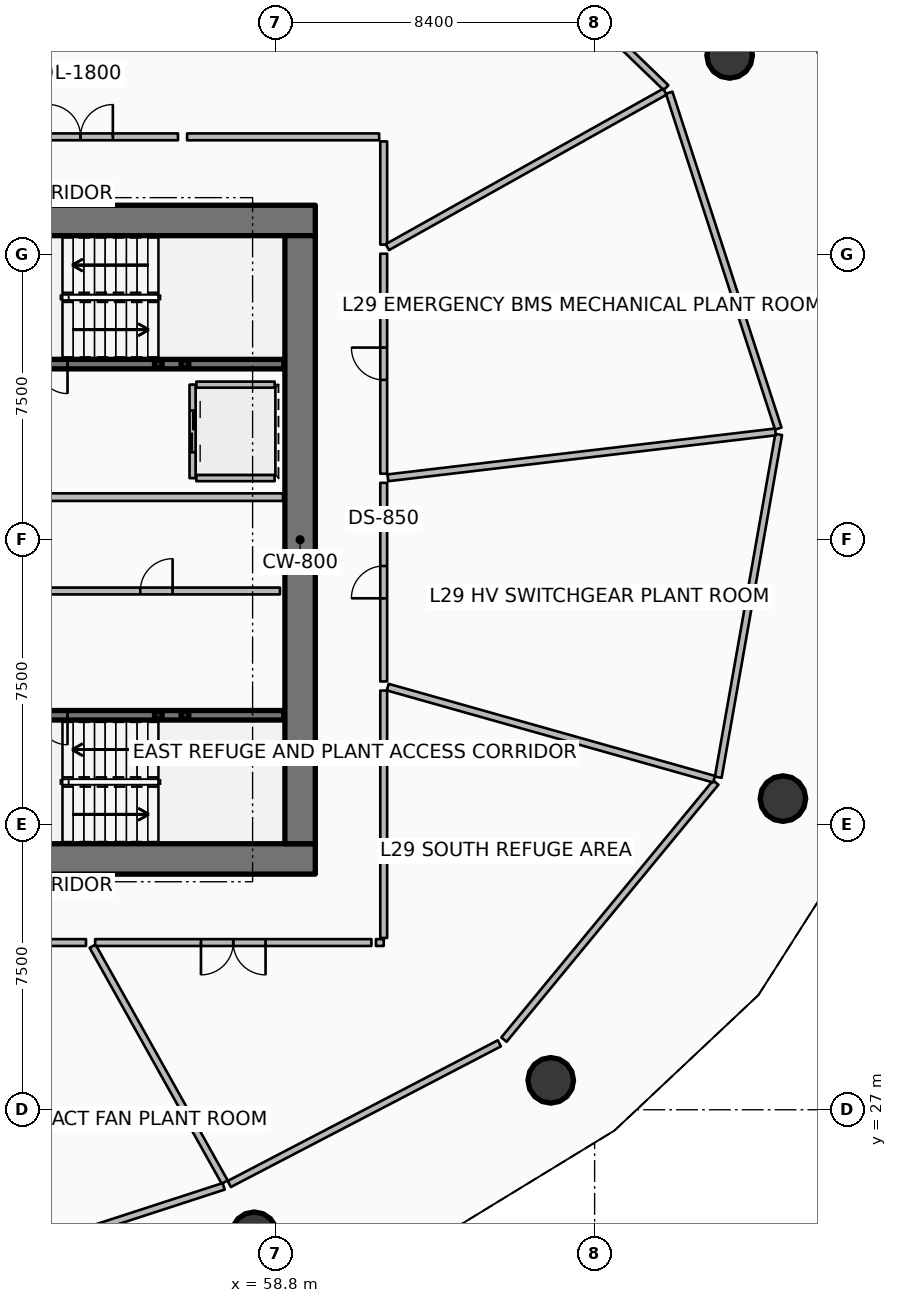
"""IFC4 building model, lengths in metres.
Left out: names, types, materials, properties, quantities, classifications, styles, units other than length and angle.
Written with IfcOpenShell. Run it as: python <this file> out.ifc"""

import sys

from ifc_helpers import new_model, si_unit, direction, frame, frame_2d, origin, origin_2d, place, context, subcontext, project, spatial, rectangle, hollow_rectangle, circle, extrude, element, fill, save


model = new_model("IFC4")
c1 = context("Model", 3, precision=1e-05, world=origin(), true_north=direction((0.0, 1.0)))
c2 = subcontext(c1, "Body", "Model", "MODEL_VIEW")
j1 = project(units=[si_unit("LENGTHUNIT", "METRE"), si_unit("PLANEANGLEUNIT", "RADIAN")], contexts=[c1])
p1 = place(None, origin())
s1 = spatial("IfcSite", under=j1, at=p1, CompositionType="ELEMENT")
p2 = place(p1, origin())
s2 = spatial("IfcBuilding", under=s1, at=p2, CompositionType="ELEMENT")
p3 = place(p2, frame((0.0, 0.0, 116.4)))
s3 = spatial("IfcBuildingStorey", under=s2, at=p3, CompositionType="ELEMENT", Elevation=116.4)
for number, where, z_axis, x_axis in (
    (1, (49.95, 33.6, 0.0), (0.0, 0.0, 1.0), (1.0, 0.0, 0.0)),
    (2, (49.95, 50.4, 0.0), (0.0, 0.0, 1.0), (1.0, 0.0, 0.0)),
):
    element("IfcWall", number, at=place(p3, frame(where, z_axis=z_axis, x_axis=x_axis)), inside=s3, PredefinedType="SHEAR", context=c2, shape_type="SweptSolid", body=[
        extrude(rectangle(XDim=9.9, YDim=0.8, at=frame_2d((4.95, 0.0))), origin(), (0.0, 0.0, 1.0), 6.6),
    ])
p4 = place(p3, frame((59.45, 34.0, 0.0), z_axis=(0.0, 0.0, 1.0), x_axis=(0.0, 1.0, 0.0)))
e3 = element("IfcWall", 3, at=p4, inside=s3, PredefinedType="SHEAR", context=c2, shape_type="SweptSolid", body=[
    extrude(rectangle(XDim=16.0, YDim=0.8, at=frame_2d((8.0, 0.0))), origin(), (0.0, 0.0, 1.0), 6.6),
])
p5 = place(p3, frame((55.72, 46.62, 0.0), z_axis=(0.0, 0.0, 1.0), x_axis=(1.0, 0.0, 0.0)))
e4 = element("IfcColumn", 4, at=p5, inside=s3, PredefinedType="COLUMN", context=c2, shape_type="SweptSolid", body=[
    extrude(hollow_rectangle(XDim=0.2, YDim=0.2, WallThickness=0.01, InnerFilletRadius=0.01, OuterFilletRadius=0.02, at=origin_2d()), origin(), (0.0, 0.0, 1.0), 1.445),
])
p6 = place(p3, frame((56.42, 46.62, 0.0), z_axis=(0.0, 0.0, 1.0), x_axis=(1.0, 0.0, 0.0)))
e5 = element("IfcColumn", 5, at=p6, inside=s3, PredefinedType="COLUMN", context=c2, shape_type="SweptSolid", body=[
    extrude(hollow_rectangle(XDim=0.2, YDim=0.2, WallThickness=0.01, InnerFilletRadius=0.01, OuterFilletRadius=0.02, at=origin_2d()), origin(), (0.0, 0.0, 1.0), 4.745),
])
p7 = place(p3, frame((55.72, 37.38, 0.0), z_axis=(0.0, 0.0, 1.0), x_axis=(1.0, 0.0, 0.0)))
e6 = element("IfcColumn", 6, at=p7, inside=s3, PredefinedType="COLUMN", context=c2, shape_type="SweptSolid", body=[
    extrude(hollow_rectangle(XDim=0.2, YDim=0.2, WallThickness=0.01, InnerFilletRadius=0.01, OuterFilletRadius=0.02, at=origin_2d()), origin(), (0.0, 0.0, 1.0), 1.445),
])
p8 = place(p3, frame((56.42, 37.38, 0.0), z_axis=(0.0, 0.0, 1.0), x_axis=(1.0, 0.0, 0.0)))
e7 = element("IfcColumn", 7, at=p8, inside=s3, PredefinedType="COLUMN", context=c2, shape_type="SweptSolid", body=[
    extrude(hollow_rectangle(XDim=0.2, YDim=0.2, WallThickness=0.01, InnerFilletRadius=0.01, OuterFilletRadius=0.02, at=origin_2d()), origin(), (0.0, 0.0, 1.0), 4.745),
])
for number, where, z_axis, x_axis in (
    (8, (70.753, 54.742, 0.0), (0.0, 0.0, 1.0), (1.0, 0.0, 0.0)),
    (9, (58.242, 23.711, 0.0), (0.0, 0.0, 1.0), (1.0, 0.0, 0.0)),
    (10, (66.045, 27.774, 0.0), (0.0, 0.0, 1.0), (1.0, 0.0, 0.0)),
    (11, (72.156, 35.188, 0.0), (0.0, 0.0, 1.0), (1.0, 0.0, 0.0)),
):
    element("IfcColumn", number, at=place(p3, frame(where, z_axis=z_axis, x_axis=x_axis)), inside=s3, PredefinedType="COLUMN", context=c2, shape_type="SweptSolid", body=[
        extrude(circle(Radius=0.6, at=origin_2d()), origin(), (0.0, 0.0, 1.0), 6.28),
    ])
p9 = place(p3, frame((51.48, 46.62, 0.0), z_axis=(0.0, 0.0, 1.0), x_axis=(1.0, 0.0, 0.0)))
e12 = element("IfcWall", 12, at=p9, inside=s3, PredefinedType="SOLIDWALL", context=c2, shape_type="SweptSolid", body=[
    extrude(rectangle(XDim=7.54, YDim=0.25, at=frame_2d((3.77, 0.0))), origin(), (0.0, 0.0, 1.0), 6.28),
])
p10 = place(p9, frame((0.3, 0.0, 0.0)))
e13 = element("IfcOpeningElement", 13, at=p10, cuts=e12, PredefinedType="OPENING", context=c2, shape_type="SweptSolid", body=[
    extrude(rectangle(XDim=1.55, YDim=2.15, at=frame_2d((0.775, 1.075))), frame((0.0, 0.135, 0.0), z_axis=(0.0, -1.0, 0.0), x_axis=(1.0, 0.0, 0.0)), (0.0, 0.0, 1.0), 0.27),
])
p11 = place(p3, frame((51.48, 37.38, 0.0), z_axis=(0.0, 0.0, 1.0), x_axis=(1.0, 0.0, 0.0)))
e14 = element("IfcWall", 14, at=p11, inside=s3, PredefinedType="SOLIDWALL", context=c2, shape_type="SweptSolid", body=[
    extrude(rectangle(XDim=7.54, YDim=0.25, at=frame_2d((3.77, 0.0))), origin(), (0.0, 0.0, 1.0), 6.28),
])
p12 = place(p11, frame((0.3, 0.0, 0.0)))
e15 = element("IfcOpeningElement", 15, at=p12, cuts=e14, PredefinedType="OPENING", context=c2, shape_type="SweptSolid", body=[
    extrude(rectangle(XDim=1.55, YDim=2.15, at=frame_2d((0.775, 1.075))), frame((0.0, 0.135, 0.0), z_axis=(0.0, -1.0, 0.0), x_axis=(1.0, 0.0, 0.0)), (0.0, 0.0, 1.0), 0.27),
])
p13 = place(p3, frame((56.62, 46.08, 0.0), z_axis=(0.0, 0.0, 1.0), x_axis=(0.0, -1.0, 0.0)))
e16 = element("IfcWall", 16, at=p13, inside=s3, PredefinedType="PARTITIONING", context=c2, shape_type="SweptSolid", body=[
    extrude(rectangle(XDim=2.46, YDim=0.16, at=frame_2d((1.23, 0.0))), origin(), (0.0, 0.0, 1.0), 6.28),
])
p14 = place(p13, frame((0.68, 0.0, 0.0)))
e17 = element("IfcOpeningElement", 17, at=p14, cuts=e16, PredefinedType="OPENING", context=c2, shape_type="SweptSolid", body=[
    extrude(rectangle(XDim=1.1, YDim=2.1, at=frame_2d((0.55, 1.05))), frame((0.0, 0.09, 0.0), z_axis=(0.0, -1.0, 0.0), x_axis=(1.0, 0.0, 0.0)), (0.0, 0.0, 1.0), 0.18),
])
for number, where, z_axis, x_axis in (
    (18, (56.72, 46.08, 0.0), (0.0, 0.0, 1.0), (1.0, 0.0, 0.0)),
    (19, (56.72, 43.62, 0.0), (0.0, 0.0, 1.0), (1.0, 0.0, 0.0)),
):
    element("IfcWall", number, at=place(p3, frame(where, z_axis=z_axis, x_axis=x_axis)), inside=s3, PredefinedType="PARTITIONING", context=c2, shape_type="SweptSolid", body=[
        extrude(rectangle(XDim=2.06, YDim=0.16, at=frame_2d((1.03, 0.0))), origin(), (0.0, 0.0, 1.0), 6.28),
    ])
p15 = place(p3, frame((52.42, 40.65, 0.0), z_axis=(0.0, 0.0, 1.0), x_axis=(1.0, 0.0, 0.0)))
e20 = element("IfcWall", 20, at=p15, inside=s3, PredefinedType="PARTITIONING", context=c2, shape_type="SweptSolid", body=[
    extrude(rectangle(XDim=6.5, YDim=0.18, at=frame_2d((3.25, 0.0))), origin(), (0.0, 0.0, 1.0), 6.28),
])
p16 = place(p15, frame((2.825, 0.0, 0.0)))
e21 = element("IfcOpeningElement", 21, at=p16, cuts=e20, PredefinedType="OPENING", context=c2, shape_type="SweptSolid", body=[
    extrude(rectangle(XDim=0.85, YDim=2.06, at=frame_2d((0.425, 1.03))), frame((0.0, 0.1, 0.0), z_axis=(0.0, -1.0, 0.0), x_axis=(1.0, 0.0, 0.0)), (0.0, 0.0, 1.0), 0.2),
])
p17 = place(p3, frame((50.12, 43.12, 0.0), z_axis=(0.0, 0.0, 1.0), x_axis=(1.0, 0.0, 0.0)))
e22 = element("IfcWall", 22, at=p17, inside=s3, PredefinedType="PARTITIONING", context=c2, shape_type="SweptSolid", body=[
    extrude(rectangle(XDim=8.88, YDim=0.2, at=frame_2d((4.44, 0.0))), origin(), (0.0, 0.0, 1.0), 6.28),
])
p18 = place(p3, frame((69.079, 53.893, 0.0), z_axis=(0.0, 0.0, 1.0), x_axis=(-0.719342658177, 0.694655411069, 0.0)))
e23 = element("IfcWall", 23, at=p18, inside=s3, PredefinedType="PARTITIONING", context=c2, shape_type="SweptSolid", body=[
    extrude(rectangle(XDim=9.157, YDim=0.18, at=frame_2d((4.579, 0.0))), origin(), (0.0, 0.0, 1.0), 2.304),
])
p19 = place(p3, frame((50.365, 22.687, 0.0), z_axis=(0.0, 0.0, 1.0), x_axis=(0.951058670218, 0.309010365204, 0.0)))
e24 = element("IfcWall", 24, at=p19, inside=s3, PredefinedType="PARTITIONING", context=c2, shape_type="SweptSolid", body=[
    extrude(rectangle(XDim=7.438, YDim=0.18, at=frame_2d((3.719, 0.0))), origin(), (0.0, 0.0, 1.0), 5.273),
])
p20 = place(p3, frame((57.586, 25.047, 0.0), z_axis=(0.0, 0.0, 1.0), x_axis=(0.886950751462, 0.46186401081, 0.0)))
e25 = element("IfcWall", 25, at=p20, inside=s3, PredefinedType="PARTITIONING", context=c2, shape_type="SweptSolid", body=[
    extrude(rectangle(XDim=8.012, YDim=0.18, at=frame_2d((4.006, 0.0))), origin(), (0.0, 0.0, 1.0), 2.304),
])
p21 = place(p3, frame((64.814, 28.846, 0.0), z_axis=(0.0, 0.0, 1.0), x_axis=(0.636015746841, 0.771676078267, 0.0)))
e26 = element("IfcWall", 26, at=p21, inside=s3, PredefinedType="PARTITIONING", context=c2, shape_type="SweptSolid", body=[
    extrude(rectangle(XDim=8.764, YDim=0.18, at=frame_2d((4.382, 0.0))), origin(), (0.0, 0.0, 1.0), 2.304),
])
p22 = place(p3, frame((70.453, 35.75, 0.0), z_axis=(0.0, 0.0, 1.0), x_axis=(0.173665182346, 0.984804754477, 0.0)))
e27 = element("IfcWall", 27, at=p22, inside=s3, PredefinedType="PARTITIONING", context=c2, shape_type="SweptSolid", body=[
    extrude(rectangle(XDim=9.157, YDim=0.18, at=frame_2d((4.579, 0.0))), origin(), (0.0, 0.0, 1.0), 2.304),
])
p23 = place(p3, frame((72.033, 44.924, 0.0), z_axis=(0.0, 0.0, 1.0), x_axis=(-0.309006462603, 0.951059938211, 0.0)))
e28 = element("IfcWall", 28, at=p23, inside=s3, PredefinedType="PARTITIONING", context=c2, shape_type="SweptSolid", body=[
    extrude(rectangle(XDim=9.292, YDim=0.18, at=frame_2d((4.646, 0.0))), origin(), (0.0, 0.0, 1.0), 5.273),
])
p24 = place(p3, frame((61.65, 49.764, 0.0), z_axis=(0.0, 0.0, 1.0), x_axis=(0.0, 1.0, 0.0)))
e29 = element("IfcWall", 29, at=p24, inside=s3, PredefinedType="PARTITIONING", context=c2, shape_type="SweptSolid", body=[
    extrude(rectangle(XDim=2.716, YDim=0.18, at=frame_2d((1.358, 0.0))), origin(), (0.0, 0.0, 1.0), 5.273),
])
p25 = place(p3, frame((61.53, 52.6, 0.0), z_axis=(0.0, 0.0, 1.0), x_axis=(-1.0, 0.0, 0.0)))
e30 = element("IfcWall", 30, at=p25, inside=s3, PredefinedType="PARTITIONING", context=c2, shape_type="SweptSolid", body=[
    extrude(rectangle(XDim=5.054, YDim=0.18, at=frame_2d((2.527, 0.0))), origin(), (0.0, 0.0, 1.0), 2.304),
])
p26 = place(p3, frame((56.236, 52.6, 0.0), z_axis=(0.0, 0.0, 1.0), x_axis=(-1.0, 0.0, 0.0)))
e31 = element("IfcWall", 31, at=p26, inside=s3, PredefinedType="PARTITIONING", context=c2, shape_type="SweptSolid", body=[
    extrude(rectangle(XDim=5.127, YDim=0.18, at=frame_2d((2.563, 0.0))), origin(), (0.0, 0.0, 1.0), 2.304),
])
p27 = place(p26, frame((1.713, 0.0, 0.0)))
e32 = element("IfcOpeningElement", 32, at=p27, cuts=e31, PredefinedType="OPENING", context=c2, shape_type="SweptSolid", body=[
    extrude(rectangle(XDim=1.7, YDim=2.15, at=frame_2d((0.85, 1.075))), frame((0.0, 0.1, 0.0), z_axis=(0.0, -1.0, 0.0), x_axis=(1.0, 0.0, 0.0)), (0.0, 0.0, 1.0), 0.2),
])
p28 = place(p3, frame((61.746, 49.698, 0.0), z_axis=(0.0, 0.0, 1.0), x_axis=(0.872491592103, 0.488629124908, 0.0)))
e33 = element("IfcWall", 33, at=p28, inside=s3, PredefinedType="PARTITIONING", context=c2, shape_type="SweptSolid", body=[
    extrude(rectangle(XDim=8.371, YDim=0.18, at=frame_2d((4.185, 0.0))), origin(), (0.0, 0.0, 1.0), 5.273),
])
p29 = place(p3, frame((49.375, 31.4, 0.0), z_axis=(0.0, 0.0, 1.0), x_axis=(1.0, 0.0, 0.0)))
e34 = element("IfcWall", 34, at=p29, inside=s3, PredefinedType="PARTITIONING", context=c2, shape_type="SweptSolid", body=[
    extrude(rectangle(XDim=4.442, YDim=0.18, at=frame_2d((2.221, 0.0))), origin(), (0.0, 0.0, 1.0), 5.273),
])
p30 = place(p29, frame((1.696, 0.0, 0.0)))
e35 = element("IfcOpeningElement", 35, at=p30, cuts=e34, PredefinedType="OPENING", context=c2, shape_type="SweptSolid", body=[
    extrude(rectangle(XDim=1.05, YDim=2.1, at=frame_2d((0.525, 1.05))), frame((0.0, 0.1, 0.0), z_axis=(0.0, -1.0, 0.0), x_axis=(1.0, 0.0, 0.0)), (0.0, 0.0, 1.0), 0.2),
])
p31 = place(p3, frame((53.99, 31.304, 0.0), z_axis=(0.0, 0.0, 1.0), x_axis=(0.488621135235, -0.872496066583, 0.0)))
e36 = element("IfcWall", 36, at=p31, inside=s3, PredefinedType="PARTITIONING", context=c2, shape_type="SweptSolid", body=[
    extrude(rectangle(XDim=7.114, YDim=0.18, at=frame_2d((3.557, 0.0))), origin(), (0.0, 0.0, 1.0), 5.273),
])
p32 = place(p3, frame((54.056, 31.4, 0.0), z_axis=(0.0, 0.0, 1.0), x_axis=(1.0, 0.0, 0.0)))
e37 = element("IfcWall", 37, at=p32, inside=s3, PredefinedType="PARTITIONING", context=c2, shape_type="SweptSolid", body=[
    extrude(rectangle(XDim=7.27, YDim=0.18, at=frame_2d((3.635, 0.0))), origin(), (0.0, 0.0, 1.0), 2.304),
])
p33 = place(p32, frame((2.785, 0.0, 0.0)))
e38 = element("IfcOpeningElement", 38, at=p33, cuts=e37, PredefinedType="OPENING", context=c2, shape_type="SweptSolid", body=[
    extrude(rectangle(XDim=1.7, YDim=2.15, at=frame_2d((0.85, 1.075))), frame((0.0, 0.1, 0.0), z_axis=(0.0, -1.0, 0.0), x_axis=(1.0, 0.0, 0.0)), (0.0, 0.0, 1.0), 0.2),
])
p34 = place(p3, frame((61.446, 31.4, 0.0), z_axis=(0.0, 0.0, 1.0), x_axis=(1.0, 0.0, 0.0)))
e39 = element("IfcWall", 39, at=p34, inside=s3, PredefinedType="PARTITIONING", context=c2, shape_type="SweptSolid", body=[
    extrude(rectangle(XDim=0.204, YDim=0.18, at=frame_2d((0.102, 0.0))), origin(), (0.0, 0.0, 1.0), 2.304),
])
p35 = place(p3, frame((61.65, 31.52, 0.0), z_axis=(0.0, 0.0, 1.0), x_axis=(0.0, 1.0, 0.0)))
e40 = element("IfcWall", 40, at=p35, inside=s3, PredefinedType="PARTITIONING", context=c2, shape_type="SweptSolid", body=[
    extrude(rectangle(XDim=6.51, YDim=0.18, at=frame_2d((3.255, 0.0))), origin(), (0.0, 0.0, 1.0), 2.304),
])
p36 = place(p3, frame((61.756, 38.12, 0.0), z_axis=(0.0, 0.0, 1.0), x_axis=(0.962455908165, -0.271438068147, 0.0)))
e41 = element("IfcWall", 41, at=p36, inside=s3, PredefinedType="PARTITIONING", context=c2, shape_type="SweptSolid", body=[
    extrude(rectangle(XDim=8.922, YDim=0.18, at=frame_2d((4.461, 0.0))), origin(), (0.0, 0.0, 1.0), 2.304),
])
p37 = place(p3, frame((61.65, 38.27, 0.0), z_axis=(0.0, 0.0, 1.0), x_axis=(0.0, 1.0, 0.0)))
e42 = element("IfcWall", 42, at=p37, inside=s3, PredefinedType="PARTITIONING", context=c2, shape_type="SweptSolid", body=[
    extrude(rectangle(XDim=5.225, YDim=0.18, at=frame_2d((2.613, 0.0))), origin(), (0.0, 0.0, 1.0), 2.304),
])
p38 = place(p37, frame((2.188, 0.0, 0.0)))
e43 = element("IfcOpeningElement", 43, at=p38, cuts=e42, PredefinedType="OPENING", context=c2, shape_type="SweptSolid", body=[
    extrude(rectangle(XDim=0.85, YDim=2.06, at=frame_2d((0.425, 1.03))), frame((0.0, 0.1, 0.0), z_axis=(0.0, -1.0, 0.0), x_axis=(1.0, 0.0, 0.0)), (0.0, 0.0, 1.0), 0.2),
])
p39 = place(p3, frame((61.759, 43.628, 0.0), z_axis=(0.0, 0.0, 1.0), x_axis=(0.993066783927, 0.117551531933, 0.0)))
e44 = element("IfcWall", 44, at=p39, inside=s3, PredefinedType="PARTITIONING", context=c2, shape_type="SweptSolid", body=[
    extrude(rectangle(XDim=10.27, YDim=0.18, at=frame_2d((5.135, 0.0))), origin(), (0.0, 0.0, 1.0), 5.273),
])
p40 = place(p3, frame((61.65, 43.736, 0.0), z_axis=(0.0, 0.0, 1.0), x_axis=(0.0, 1.0, 0.0)))
e45 = element("IfcWall", 45, at=p40, inside=s3, PredefinedType="PARTITIONING", context=c2, shape_type="SweptSolid", body=[
    extrude(rectangle(XDim=5.789, YDim=0.18, at=frame_2d((2.895, 0.0))), origin(), (0.0, 0.0, 1.0), 5.273),
])
p41 = place(p40, frame((2.469, 0.0, 0.0)))
e46 = element("IfcOpeningElement", 46, at=p41, cuts=e45, PredefinedType="OPENING", context=c2, shape_type="SweptSolid", body=[
    extrude(rectangle(XDim=0.85, YDim=2.06, at=frame_2d((0.425, 1.03))), frame((0.0, 0.1, 0.0), z_axis=(0.0, -1.0, 0.0), x_axis=(1.0, 0.0, 0.0)), (0.0, 0.0, 1.0), 0.2),
])
p42 = place(p10, origin())
e47 = element("IfcDoor", 47, at=p42, inside=s3, OperationType="DOUBLE_DOOR_SINGLE_SWING", PredefinedType="DOOR", context=c2, shape_type="SweptSolid", body=[
    extrude(rectangle(XDim=1.55, YDim=2.15, at=frame_2d((0.775, 1.075))), frame((0.0, 0.025, 0.0), z_axis=(0.0, -1.0, 0.0), x_axis=(1.0, 0.0, 0.0)), (0.0, 0.0, 1.0), 0.05),
])
fill(e13, e47)
p43 = place(p12, origin())
e48 = element("IfcDoor", 48, at=p43, inside=s3, OperationType="DOUBLE_DOOR_SINGLE_SWING", PredefinedType="DOOR", context=c2, shape_type="SweptSolid", body=[
    extrude(rectangle(XDim=1.55, YDim=2.15, at=frame_2d((0.775, 1.075))), frame((0.0, 0.025, 0.0), z_axis=(0.0, -1.0, 0.0), x_axis=(1.0, 0.0, 0.0)), (0.0, 0.0, 1.0), 0.05),
])
fill(e15, e48)
p44 = place(p14, origin())
e49 = element("IfcDoor", 49, at=p44, inside=s3, OperationType="DOUBLE_DOOR_SLIDING", PredefinedType="DOOR", context=c2, shape_type="SweptSolid", body=[
    extrude(rectangle(XDim=1.1, YDim=2.1, at=frame_2d((0.55, 1.05))), frame((0.0, 0.025, 0.0), z_axis=(0.0, -1.0, 0.0), x_axis=(1.0, 0.0, 0.0)), (0.0, 0.0, 1.0), 0.05),
])
fill(e17, e49)
p45 = place(p16, origin())
e50 = element("IfcDoor", 50, at=p45, inside=s3, OperationType="SINGLE_SWING_RIGHT", PredefinedType="DOOR", context=c2, shape_type="SweptSolid", body=[
    extrude(rectangle(XDim=0.85, YDim=2.06, at=frame_2d((0.425, 1.03))), frame((0.0, 0.025, 0.0), z_axis=(0.0, -1.0, 0.0), x_axis=(1.0, 0.0, 0.0)), (0.0, 0.0, 1.0), 0.05),
])
fill(e21, e50)
p46 = place(p27, origin())
e51 = element("IfcDoor", 51, at=p46, inside=s3, OperationType="DOUBLE_DOOR_SINGLE_SWING", PredefinedType="DOOR", context=c2, shape_type="SweptSolid", body=[
    extrude(rectangle(XDim=1.7, YDim=2.15, at=frame_2d((0.85, 1.075))), frame((0.0, 0.025, 0.0), z_axis=(0.0, -1.0, 0.0), x_axis=(1.0, 0.0, 0.0)), (0.0, 0.0, 1.0), 0.05),
])
fill(e32, e51)
p47 = place(p33, origin())
e52 = element("IfcDoor", 52, at=p47, inside=s3, OperationType="DOUBLE_DOOR_SINGLE_SWING", PredefinedType="DOOR", context=c2, shape_type="SweptSolid", body=[
    extrude(rectangle(XDim=1.7, YDim=2.15, at=frame_2d((0.85, 1.075))), frame((0.0, 0.025, 0.0), z_axis=(0.0, -1.0, 0.0), x_axis=(1.0, 0.0, 0.0)), (0.0, 0.0, 1.0), 0.05),
])
fill(e38, e52)
p48 = place(p38, origin())
e53 = element("IfcDoor", 53, at=p48, inside=s3, OperationType="SINGLE_SWING_LEFT", PredefinedType="DOOR", context=c2, shape_type="SweptSolid", body=[
    extrude(rectangle(XDim=0.85, YDim=2.06, at=frame_2d((0.425, 1.03))), frame((0.0, 0.025, 0.0), z_axis=(0.0, -1.0, 0.0), x_axis=(1.0, 0.0, 0.0)), (0.0, 0.0, 1.0), 0.05),
])
fill(e43, e53)
p49 = place(p41, origin())
e54 = element("IfcDoor", 54, at=p49, inside=s3, OperationType="SINGLE_SWING_RIGHT", PredefinedType="DOOR", context=c2, shape_type="SweptSolid", body=[
    extrude(rectangle(XDim=0.85, YDim=2.06, at=frame_2d((0.425, 1.03))), frame((0.0, 0.025, 0.0), z_axis=(0.0, -1.0, 0.0), x_axis=(1.0, 0.0, 0.0)), (0.0, 0.0, 1.0), 0.05),
])
fill(e46, e54)
save(model, sys.argv[1])
